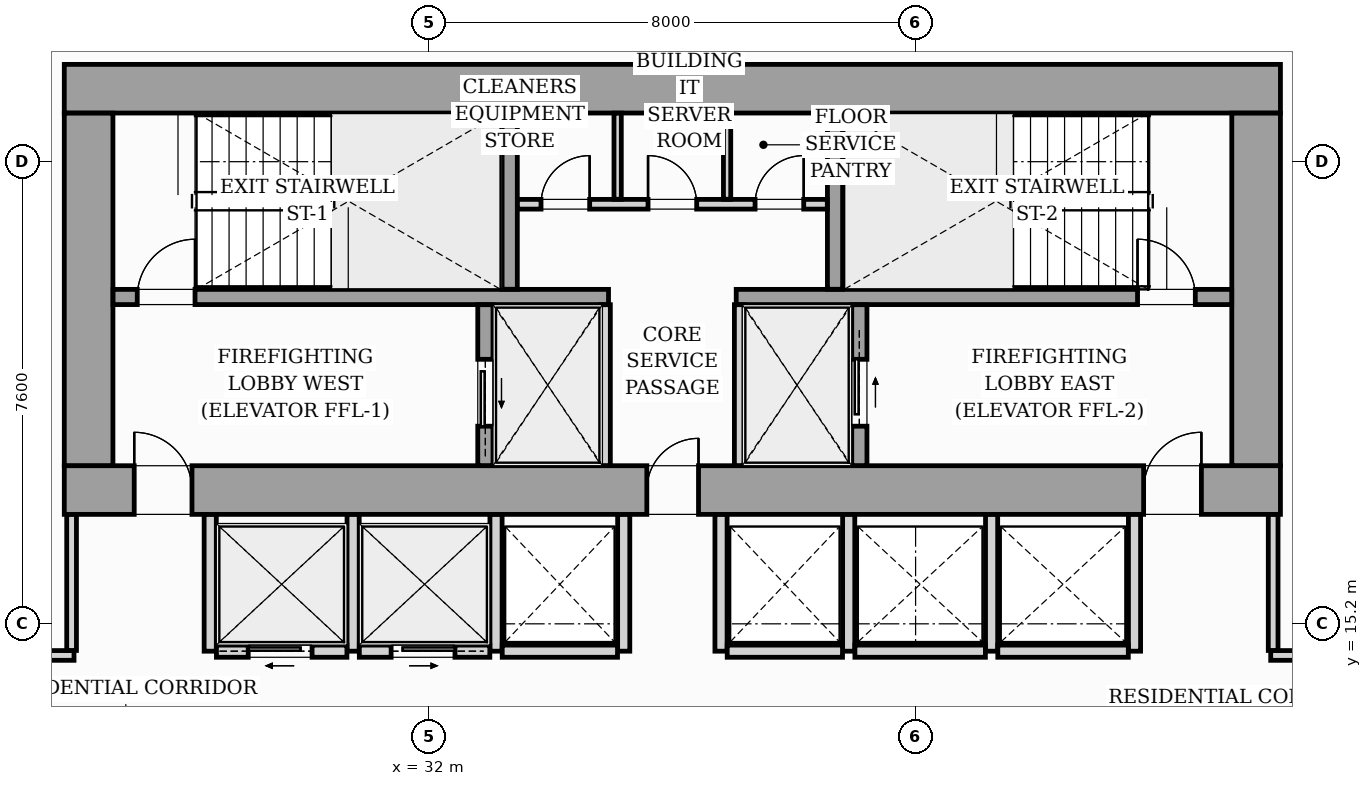
"""IFC4 building model, lengths in metres.
Left out: names, types, materials, properties, quantities, classifications, styles, units other than length and angle.
Written with IfcOpenShell. Run it as: python <this file> out.ifc"""

import sys

from ifc_helpers import new_model, si_unit, direction, frame, frame_2d, origin, origin_2d, place, context, subcontext, project, spatial, rectangle, i_section, extrude, source, transform, mapped, element, fill, save


model = new_model("IFC4")
c1 = context("Model", 3, precision=1e-05, world=origin(), true_north=direction((0.0, 1.0)))
c2 = subcontext(c1, "Body", "Model", "MODEL_VIEW")
j1 = project(units=[si_unit("LENGTHUNIT", "METRE"), si_unit("PLANEANGLEUNIT", "RADIAN")], contexts=[c1])
p1 = place(None, origin())
s1 = spatial("IfcSite", under=j1, at=p1, CompositionType="ELEMENT")
p2 = place(p1, origin())
s2 = spatial("IfcBuilding", under=s1, at=p2, CompositionType="ELEMENT")
p3 = place(p2, frame((0.0, 0.0, 29.4)))
s3 = spatial("IfcBuildingStorey", under=s2, at=p3, CompositionType="ELEMENT", Elevation=29.4)
m1 = source(origin(), c2, "Body", "SweptSolid", [
    extrude(i_section(OverallWidth=0.437, OverallDepth=0.514, WebThickness=0.061, FlangeThickness=0.097, FilletRadius=0.018, at=origin_2d()), origin(), (0.0, 0.0, 1.0), 3.196),
])
for number, where, z_axis, x_axis in (
    (1, (26.4, 17.4, 0.002), (0.0, 0.0, 1.0), (1.0, 0.0, 0.0)),
    (2, (33.12, 17.4, 0.002), (0.0, 0.0, 1.0), (1.0, 0.0, 0.0)),
    (3, (38.88, 17.4, 0.002), (0.0, 0.0, 1.0), (1.0, 0.0, 0.0)),
    (4, (45.6, 17.4, 0.002), (0.0, 0.0, 1.0), (1.0, 0.0, 0.0)),
    (5, (26.4, 24.0, 0.002), (0.0, 0.0, 1.0), (1.0, 0.0, 0.0)),
    (6, (33.12, 24.0, 0.002), (0.0, 0.0, 1.0), (1.0, 0.0, 0.0)),
    (7, (38.88, 24.0, 0.002), (0.0, 0.0, 1.0), (1.0, 0.0, 0.0)),
    (8, (45.6, 24.0, 0.002), (0.0, 0.0, 1.0), (1.0, 0.0, 0.0)),
):
    element("IfcColumn", number, at=place(p3, frame(where, z_axis=z_axis, x_axis=x_axis)), inside=s3, PredefinedType="PILASTER", context=c2, shape_type="MappedRepresentation", body=[
        mapped(m1, transform((0.0, 0.0, 0.0), scale=1.0)),
    ])
p4 = place(p3, frame((26.0, 17.4, 0.0), z_axis=(0.0, 0.0, 1.0), x_axis=(1.0, 0.0, 0.0)))
e9 = element("IfcWall", 9, at=p4, inside=s3, PredefinedType="SHEAR", context=c2, shape_type="SweptSolid", body=[
    extrude(rectangle(XDim=20.0, YDim=0.8, at=frame_2d((10.0, 0.0))), origin(), (0.0, 0.0, 1.0), 3.2),
])
p5 = place(p4, frame((1.15, 0.0, 0.0)))
e10 = element("IfcOpeningElement", 10, at=p5, cuts=e9, PredefinedType="OPENING", context=c2, shape_type="SweptSolid", body=[
    extrude(rectangle(XDim=0.95, YDim=2.06, at=frame_2d((0.475, 1.03))), frame((0.0, 0.41, 0.0), z_axis=(0.0, -1.0, 0.0), x_axis=(1.0, 0.0, 0.0)), (0.0, 0.0, 1.0), 0.82),
])
p6 = place(p4, frame((9.58, 0.0, 0.0)))
e11 = element("IfcOpeningElement", 11, at=p6, cuts=e9, PredefinedType="OPENING", context=c2, shape_type="SweptSolid", body=[
    extrude(rectangle(XDim=0.85, YDim=2.0, at=frame_2d((0.425, 1.0))), frame((0.0, 0.41, 0.0), z_axis=(0.0, -1.0, 0.0), x_axis=(1.0, 0.0, 0.0)), (0.0, 0.0, 1.0), 0.82),
])
p7 = place(p4, frame((17.75, 0.0, 0.0)))
e12 = element("IfcOpeningElement", 12, at=p7, cuts=e9, PredefinedType="OPENING", context=c2, shape_type="SweptSolid", body=[
    extrude(rectangle(XDim=0.95, YDim=2.06, at=frame_2d((0.475, 1.03))), frame((0.0, 0.41, 0.0), z_axis=(0.0, -1.0, 0.0), x_axis=(1.0, 0.0, 0.0)), (0.0, 0.0, 1.0), 0.82),
])
p8 = place(p3, frame((26.0, 24.0, 0.0), z_axis=(0.0, 0.0, 1.0), x_axis=(1.0, 0.0, 0.0)))
e13 = element("IfcWall", 13, at=p8, inside=s3, PredefinedType="SHEAR", context=c2, shape_type="SweptSolid", body=[
    extrude(rectangle(XDim=20.0, YDim=0.8, at=frame_2d((10.0, 0.0))), origin(), (0.0, 0.0, 1.0), 3.2),
])
for number, where, z_axis, x_axis in (
    (14, (26.4, 17.802, 0.0), (0.0, 0.0, 1.0), (0.0, 1.0, 0.0)),
    (15, (45.6, 17.802, 0.0), (0.0, 0.0, 1.0), (0.0, 1.0, 0.0)),
):
    element("IfcWall", number, at=place(p3, frame(where, z_axis=z_axis, x_axis=x_axis)), inside=s3, PredefinedType="SHEAR", context=c2, shape_type="SweptSolid", body=[
        extrude(rectangle(XDim=5.796, YDim=0.8, at=frame_2d((2.898, 0.0))), origin(), (0.0, 0.0, 1.0), 3.2),
    ])
p9 = place(p3, frame((26.802, 20.575, 0.0), z_axis=(0.0, 0.0, 1.0), x_axis=(1.0, 0.0, 0.0)))
e16 = element("IfcWall", 16, at=p9, inside=s3, PredefinedType="SOLIDWALL", context=c2, shape_type="SweptSolid", body=[
    extrude(rectangle(XDim=8.148, YDim=0.25, at=frame_2d((4.074, 0.0))), origin(), (0.0, 0.0, 1.0), 3.2),
])
p10 = place(p9, frame((0.398, 0.0, 0.0)))
e17 = element("IfcOpeningElement", 17, at=p10, cuts=e16, PredefinedType="OPENING", context=c2, shape_type="SweptSolid", body=[
    extrude(rectangle(XDim=0.95, YDim=2.06, at=frame_2d((0.475, 1.03))), frame((0.0, 0.135, 0.0), z_axis=(0.0, -1.0, 0.0), x_axis=(1.0, 0.0, 0.0)), (0.0, 0.0, 1.0), 0.27),
])
p11 = place(p3, frame((37.05, 20.575, 0.0), z_axis=(0.0, 0.0, 1.0), x_axis=(1.0, 0.0, 0.0)))
e18 = element("IfcWall", 18, at=p11, inside=s3, PredefinedType="SOLIDWALL", context=c2, shape_type="SweptSolid", body=[
    extrude(rectangle(XDim=8.148, YDim=0.25, at=frame_2d((4.074, 0.0))), origin(), (0.0, 0.0, 1.0), 3.2),
])
p12 = place(p11, frame((6.6, 0.0, 0.0)))
e19 = element("IfcOpeningElement", 19, at=p12, cuts=e18, PredefinedType="OPENING", context=c2, shape_type="SweptSolid", body=[
    extrude(rectangle(XDim=0.95, YDim=2.06, at=frame_2d((0.475, 1.03))), frame((0.0, 0.135, 0.0), z_axis=(0.0, -1.0, 0.0), x_axis=(1.0, 0.0, 0.0)), (0.0, 0.0, 1.0), 0.27),
])
for number, where, z_axis, x_axis in (
    (20, (33.325, 20.702, 0.0), (0.0, 0.0, 1.0), (0.0, 1.0, 0.0)),
    (21, (38.675, 20.702, 0.0), (0.0, 0.0, 1.0), (0.0, 1.0, 0.0)),
):
    element("IfcWall", number, at=place(p3, frame(where, z_axis=z_axis, x_axis=x_axis)), inside=s3, PredefinedType="SOLIDWALL", context=c2, shape_type="SweptSolid", body=[
        extrude(rectangle(XDim=2.896, YDim=0.25, at=frame_2d((1.448, 0.0))), origin(), (0.0, 0.0, 1.0), 3.2),
    ])
p13 = place(p3, frame((32.925, 17.802, 0.0), z_axis=(0.0, 0.0, 1.0), x_axis=(0.0, 1.0, 0.0)))
e22 = element("IfcWall", 22, at=p13, inside=s3, PredefinedType="SOLIDWALL", context=c2, shape_type="SweptSolid", body=[
    extrude(rectangle(XDim=2.646, YDim=0.25, at=frame_2d((1.323, 0.0))), origin(), (0.0, 0.0, 1.0), 3.2),
])
p14 = place(p13, frame((0.648, 0.0, 0.0)))
e23 = element("IfcOpeningElement", 23, at=p14, cuts=e22, PredefinedType="OPENING", context=c2, shape_type="SweptSolid", body=[
    extrude(rectangle(XDim=1.1, YDim=2.08, at=frame_2d((0.55, 1.04))), frame((0.0, 0.135, 0.0), z_axis=(0.0, -1.0, 0.0), x_axis=(1.0, 0.0, 0.0)), (0.0, 0.0, 1.0), 0.27),
])
for number, where, z_axis, x_axis in (
    (24, (34.9, 17.802, 0.0), (0.0, 0.0, 1.0), (0.0, 1.0, 0.0)),
    (25, (37.1, 17.802, 0.0), (0.0, 0.0, 1.0), (0.0, 1.0, 0.0)),
):
    element("IfcWall", number, at=place(p3, frame(where, z_axis=z_axis, x_axis=x_axis)), inside=s3, PredefinedType="PARTITIONING", context=c2, shape_type="SweptSolid", body=[
        extrude(rectangle(XDim=2.646, YDim=0.16, at=frame_2d((1.323, 0.0))), origin(), (0.0, 0.0, 1.0), 2.94),
    ])
p15 = place(p3, frame((39.075, 17.802, 0.0), z_axis=(0.0, 0.0, 1.0), x_axis=(0.0, 1.0, 0.0)))
e26 = element("IfcWall", 26, at=p15, inside=s3, PredefinedType="SOLIDWALL", context=c2, shape_type="SweptSolid", body=[
    extrude(rectangle(XDim=2.646, YDim=0.25, at=frame_2d((1.323, 0.0))), origin(), (0.0, 0.0, 1.0), 3.2),
])
p16 = place(p15, frame((0.648, 0.0, 0.0)))
e27 = element("IfcOpeningElement", 27, at=p16, cuts=e26, PredefinedType="OPENING", context=c2, shape_type="SweptSolid", body=[
    extrude(rectangle(XDim=1.1, YDim=2.08, at=frame_2d((0.55, 1.04))), frame((0.0, 0.135, 0.0), z_axis=(0.0, -1.0, 0.0), x_axis=(1.0, 0.0, 0.0)), (0.0, 0.0, 1.0), 0.27),
])
p17 = place(p3, frame((33.452, 22.1, 0.0), z_axis=(0.0, 0.0, 1.0), x_axis=(1.0, 0.0, 0.0)))
e28 = element("IfcWall", 28, at=p17, inside=s3, PredefinedType="PARTITIONING", context=c2, shape_type="SweptSolid", body=[
    extrude(rectangle(XDim=5.096, YDim=0.16, at=frame_2d((2.548, 0.0))), origin(), (0.0, 0.0, 1.0), 2.94),
])
p18 = place(p17, frame((0.388, 0.0, 0.0)))
e29 = element("IfcOpeningElement", 29, at=p18, cuts=e28, PredefinedType="OPENING", context=c2, shape_type="SweptSolid", body=[
    extrude(rectangle(XDim=0.8, YDim=2.05, at=frame_2d((0.4, 1.025))), frame((0.0, 0.09, 0.0), z_axis=(0.0, -1.0, 0.0), x_axis=(1.0, 0.0, 0.0)), (0.0, 0.0, 1.0), 0.18),
])
p19 = place(p17, frame((2.148, 0.0, 0.0)))
e30 = element("IfcOpeningElement", 30, at=p19, cuts=e28, PredefinedType="OPENING", context=c2, shape_type="SweptSolid", body=[
    extrude(rectangle(XDim=0.8, YDim=2.05, at=frame_2d((0.4, 1.025))), frame((0.0, 0.09, 0.0), z_axis=(0.0, -1.0, 0.0), x_axis=(1.0, 0.0, 0.0)), (0.0, 0.0, 1.0), 0.18),
])
p20 = place(p17, frame((3.908, 0.0, 0.0)))
e31 = element("IfcOpeningElement", 31, at=p20, cuts=e28, PredefinedType="OPENING", context=c2, shape_type="SweptSolid", body=[
    extrude(rectangle(XDim=0.8, YDim=2.05, at=frame_2d((0.4, 1.025))), frame((0.0, 0.09, 0.0), z_axis=(0.0, -1.0, 0.0), x_axis=(1.0, 0.0, 0.0)), (0.0, 0.0, 1.0), 0.18),
])
for number, where, z_axis, x_axis in (
    (32, (35.1, 22.182, 0.0), (0.0, 0.0, 1.0), (0.0, 1.0, 0.0)),
    (33, (36.9, 22.182, 0.0), (0.0, 0.0, 1.0), (0.0, 1.0, 0.0)),
):
    element("IfcWall", number, at=place(p3, frame(where, z_axis=z_axis, x_axis=x_axis)), inside=s3, PredefinedType="PARTITIONING", context=c2, shape_type="SweptSolid", body=[
        extrude(rectangle(XDim=1.416, YDim=0.12, at=frame_2d((0.708, 0.0))), origin(), (0.0, 0.0, 1.0), 2.94),
    ])
for number, where, z_axis, x_axis in (
    (34, (28.4, 14.75, 0.0), (0.0, 0.0, 1.0), (0.0, 1.0, 0.0)),
    (35, (30.75, 14.75, 0.0), (0.0, 0.0, 1.0), (0.0, 1.0, 0.0)),
    (36, (33.1, 14.75, 0.0), (0.0, 0.0, 1.0), (0.0, 1.0, 0.0)),
):
    element("IfcWall", number, at=place(p3, frame(where, z_axis=z_axis, x_axis=x_axis)), inside=s3, PredefinedType="PARTITIONING", context=c2, shape_type="SweptSolid", body=[
        extrude(rectangle(XDim=2.248, YDim=0.2, at=frame_2d((1.124, 0.0))), origin(), (0.0, 0.0, 1.0), 2.94),
    ])
p21 = place(p3, frame((28.502, 14.75, 0.0), z_axis=(0.0, 0.0, 1.0), x_axis=(1.0, 0.0, 0.0)))
e37 = element("IfcWall", 37, at=p21, inside=s3, PredefinedType="PARTITIONING", context=c2, shape_type="SweptSolid", body=[
    extrude(rectangle(XDim=2.146, YDim=0.2, at=frame_2d((1.073, 0.0))), origin(), (0.0, 0.0, 1.0), 2.94),
])
p22 = place(p21, frame((0.523, 0.0, 0.0)))
e38 = element("IfcOpeningElement", 38, at=p22, cuts=e37, PredefinedType="OPENING", context=c2, shape_type="SweptSolid", body=[
    extrude(rectangle(XDim=1.05, YDim=2.08, at=frame_2d((0.525, 1.04))), frame((0.0, 0.11, 0.0), z_axis=(0.0, -1.0, 0.0), x_axis=(1.0, 0.0, 0.0)), (0.0, 0.0, 1.0), 0.22),
])
p23 = place(p3, frame((30.852, 14.75, 0.0), z_axis=(0.0, 0.0, 1.0), x_axis=(1.0, 0.0, 0.0)))
e39 = element("IfcWall", 39, at=p23, inside=s3, PredefinedType="PARTITIONING", context=c2, shape_type="SweptSolid", body=[
    extrude(rectangle(XDim=2.146, YDim=0.2, at=frame_2d((1.073, 0.0))), origin(), (0.0, 0.0, 1.0), 2.94),
])
p24 = place(p23, frame((0.523, 0.0, 0.0)))
e40 = element("IfcOpeningElement", 40, at=p24, cuts=e39, PredefinedType="OPENING", context=c2, shape_type="SweptSolid", body=[
    extrude(rectangle(XDim=1.05, YDim=2.08, at=frame_2d((0.525, 1.04))), frame((0.0, 0.11, 0.0), z_axis=(0.0, -1.0, 0.0), x_axis=(1.0, 0.0, 0.0)), (0.0, 0.0, 1.0), 0.22),
])
p25 = place(p3, frame((35.2, 14.75, 0.0), z_axis=(0.0, 0.0, 1.0), x_axis=(0.0, 1.0, 0.0)))
e41 = element("IfcWall", 41, at=p25, inside=s3, PredefinedType="PARTITIONING", context=c2, shape_type="SweptSolid", body=[
    extrude(rectangle(XDim=2.248, YDim=0.2, at=frame_2d((1.124, 0.0))), origin(), (0.0, 0.0, 1.0), 2.94),
])
p26 = place(p3, frame((33.202, 14.75, 0.0), z_axis=(0.0, 0.0, 1.0), x_axis=(1.0, 0.0, 0.0)))
e42 = element("IfcWall", 42, at=p26, inside=s3, PredefinedType="PARTITIONING", context=c2, shape_type="SweptSolid", body=[
    extrude(rectangle(XDim=1.896, YDim=0.2, at=frame_2d((0.948, 0.0))), origin(), (0.0, 0.0, 1.0), 2.94),
])
for number, where, z_axis, x_axis in (
    (43, (36.8, 14.75, 0.0), (0.0, 0.0, 1.0), (0.0, 1.0, 0.0)),
    (44, (38.9, 14.75, 0.0), (0.0, 0.0, 1.0), (0.0, 1.0, 0.0)),
):
    element("IfcWall", number, at=place(p3, frame(where, z_axis=z_axis, x_axis=x_axis)), inside=s3, PredefinedType="PARTITIONING", context=c2, shape_type="SweptSolid", body=[
        extrude(rectangle(XDim=2.248, YDim=0.2, at=frame_2d((1.124, 0.0))), origin(), (0.0, 0.0, 1.0), 2.94),
    ])
p27 = place(p3, frame((36.902, 14.75, 0.0), z_axis=(0.0, 0.0, 1.0), x_axis=(1.0, 0.0, 0.0)))
e45 = element("IfcWall", 45, at=p27, inside=s3, PredefinedType="PARTITIONING", context=c2, shape_type="SweptSolid", body=[
    extrude(rectangle(XDim=1.896, YDim=0.2, at=frame_2d((0.948, 0.0))), origin(), (0.0, 0.0, 1.0), 2.94),
])
for number, where, z_axis, x_axis in (
    (46, (41.25, 14.75, 0.0), (0.0, 0.0, 1.0), (0.0, 1.0, 0.0)),
    (47, (43.6, 14.75, 0.0), (0.0, 0.0, 1.0), (0.0, 1.0, 0.0)),
):
    element("IfcWall", number, at=place(p3, frame(where, z_axis=z_axis, x_axis=x_axis)), inside=s3, PredefinedType="PARTITIONING", context=c2, shape_type="SweptSolid", body=[
        extrude(rectangle(XDim=2.248, YDim=0.2, at=frame_2d((1.124, 0.0))), origin(), (0.0, 0.0, 1.0), 2.94),
    ])
for number, where, z_axis, x_axis in (
    (48, (39.002, 14.75, 0.0), (0.0, 0.0, 1.0), (1.0, 0.0, 0.0)),
    (49, (41.352, 14.75, 0.0), (0.0, 0.0, 1.0), (1.0, 0.0, 0.0)),
):
    element("IfcWall", number, at=place(p3, frame(where, z_axis=z_axis, x_axis=x_axis)), inside=s3, PredefinedType="PARTITIONING", context=c2, shape_type="SweptSolid", body=[
        extrude(rectangle(XDim=2.146, YDim=0.2, at=frame_2d((1.073, 0.0))), origin(), (0.0, 0.0, 1.0), 2.94),
    ])
p28 = place(p3, frame((36.0, 24.402, 0.0), z_axis=(0.0, 0.0, 1.0), x_axis=(0.0, 1.0, 0.0)))
e50 = element("IfcWall", 50, at=p28, inside=s3, PredefinedType="PARTITIONING", context=c2, shape_type="SweptSolid", body=[
    extrude(rectangle(XDim=3.218, YDim=0.2, at=frame_2d((1.609, 0.0))), origin(), (0.0, 0.0, 1.0), 2.94),
])
p29 = place(p3, frame((15.282, 14.68, 0.0), z_axis=(0.0, 0.0, 1.0), x_axis=(1.0, 0.0, 0.0)))
e51 = element("IfcWall", 51, at=p29, inside=s3, PredefinedType="PARTITIONING", context=c2, shape_type="SweptSolid", body=[
    extrude(rectangle(XDim=10.878, YDim=0.16, at=frame_2d((5.439, 0.0))), origin(), (0.0, 0.0, 1.0), 2.94),
])
p30 = place(p29, frame((4.863, 0.0, 0.0)))
e52 = element("IfcOpeningElement", 52, at=p30, cuts=e51, PredefinedType="OPENING", context=c2, shape_type="SweptSolid", body=[
    extrude(rectangle(XDim=0.95, YDim=2.06, at=frame_2d((0.475, 1.03))), frame((0.0, 0.09, 0.0), z_axis=(0.0, -1.0, 0.0), x_axis=(1.0, 0.0, 0.0)), (0.0, 0.0, 1.0), 0.18),
])
p31 = place(p3, frame((26.12, 14.762, 0.0), z_axis=(0.0, 0.0, 1.0), x_axis=(0.0, 1.0, 0.0)))
e53 = element("IfcWall", 53, at=p31, inside=s3, PredefinedType="PARTITIONING", context=c2, shape_type="SweptSolid", body=[
    extrude(rectangle(XDim=2.236, YDim=0.16, at=frame_2d((1.118, 0.0))), origin(), (0.0, 0.0, 1.0), 2.94),
])
p32 = place(p3, frame((45.84, 14.68, 0.0), z_axis=(0.0, 0.0, 1.0), x_axis=(1.0, 0.0, 0.0)))
e54 = element("IfcWall", 54, at=p32, inside=s3, PredefinedType="PARTITIONING", context=c2, shape_type="SweptSolid", body=[
    extrude(rectangle(XDim=6.378, YDim=0.16, at=frame_2d((3.189, 0.0))), origin(), (0.0, 0.0, 1.0), 2.94),
])
p33 = place(p32, frame((2.815, 0.0, 0.0)))
e55 = element("IfcOpeningElement", 55, at=p33, cuts=e54, PredefinedType="OPENING", context=c2, shape_type="SweptSolid", body=[
    extrude(rectangle(XDim=0.95, YDim=2.06, at=frame_2d((0.475, 1.03))), frame((0.0, 0.09, 0.0), z_axis=(0.0, -1.0, 0.0), x_axis=(1.0, 0.0, 0.0)), (0.0, 0.0, 1.0), 0.18),
])
p34 = place(p3, frame((45.88, 14.762, 0.0), z_axis=(0.0, 0.0, 1.0), x_axis=(0.0, 1.0, 0.0)))
e56 = element("IfcWall", 56, at=p34, inside=s3, PredefinedType="PARTITIONING", context=c2, shape_type="SweptSolid", body=[
    extrude(rectangle(XDim=2.236, YDim=0.16, at=frame_2d((1.118, 0.0))), origin(), (0.0, 0.0, 1.0), 2.94),
])
m2 = source(origin(), c2, "Body", "SweptSolid", [
    extrude(rectangle(XDim=0.95, YDim=2.06, at=frame_2d((0.475, 1.03))), frame((0.0, 0.025, 0.0), z_axis=(0.0, -1.0, 0.0), x_axis=(1.0, 0.0, 0.0)), (0.0, 0.0, 1.0), 0.05),
])
p35 = place(p5, origin())
e57 = element("IfcDoor", 57, at=p35, inside=s3, OperationType="SINGLE_SWING_LEFT", PredefinedType="DOOR", context=c2, shape_type="MappedRepresentation", body=[
    mapped(m2, transform((0.0, 0.0, 0.0), scale=1.0)),
])
fill(e10, e57)
m3 = source(origin(), c2, "Body", "SweptSolid", [
    extrude(rectangle(XDim=0.85, YDim=2.0, at=frame_2d((0.425, 1.0))), frame((0.0, 0.025, 0.0), z_axis=(0.0, -1.0, 0.0), x_axis=(1.0, 0.0, 0.0)), (0.0, 0.0, 1.0), 0.05),
])
p36 = place(p6, origin())
e58 = element("IfcDoor", 58, at=p36, inside=s3, OperationType="SINGLE_SWING_RIGHT", PredefinedType="DOOR", context=c2, shape_type="MappedRepresentation", body=[
    mapped(m3, transform((0.0, 0.0, 0.0), scale=1.0)),
])
fill(e11, e58)
p37 = place(p7, origin())
e59 = element("IfcDoor", 59, at=p37, inside=s3, OperationType="SINGLE_SWING_RIGHT", PredefinedType="DOOR", context=c2, shape_type="MappedRepresentation", body=[
    mapped(m2, transform((0.0, 0.0, 0.0), scale=1.0)),
])
fill(e12, e59)
p38 = place(p10, origin())
e60 = element("IfcDoor", 60, at=p38, inside=s3, OperationType="SINGLE_SWING_RIGHT", PredefinedType="DOOR", context=c2, shape_type="MappedRepresentation", body=[
    mapped(m2, transform((0.0, 0.0, 0.0), scale=1.0)),
])
fill(e17, e60)
p39 = place(p12, origin())
e61 = element("IfcDoor", 61, at=p39, inside=s3, OperationType="SINGLE_SWING_LEFT", PredefinedType="DOOR", context=c2, shape_type="MappedRepresentation", body=[
    mapped(m2, transform((0.0, 0.0, 0.0), scale=1.0)),
])
fill(e19, e61)
m4 = source(origin(), c2, "Body", "SweptSolid", [
    extrude(rectangle(XDim=1.1, YDim=2.08, at=frame_2d((0.55, 1.04))), frame((0.0, 0.025, 0.0), z_axis=(0.0, -1.0, 0.0), x_axis=(1.0, 0.0, 0.0)), (0.0, 0.0, 1.0), 0.05),
])
p40 = place(p14, origin())
e62 = element("IfcDoor", 62, at=p40, inside=s3, OperationType="SLIDING_TO_LEFT", PredefinedType="DOOR", context=c2, shape_type="MappedRepresentation", body=[
    mapped(m4, transform((0.0, 0.0, 0.0), scale=1.0)),
])
fill(e23, e62)
p41 = place(p16, origin())
e63 = element("IfcDoor", 63, at=p41, inside=s3, OperationType="SLIDING_TO_RIGHT", PredefinedType="DOOR", context=c2, shape_type="MappedRepresentation", body=[
    mapped(m4, transform((0.0, 0.0, 0.0), scale=1.0)),
])
fill(e27, e63)
m5 = source(origin(), c2, "Body", "SweptSolid", [
    extrude(rectangle(XDim=0.8, YDim=2.05, at=frame_2d((0.4, 1.025))), frame((0.0, 0.025, 0.0), z_axis=(0.0, -1.0, 0.0), x_axis=(1.0, 0.0, 0.0)), (0.0, 0.0, 1.0), 0.05),
])
p42 = place(p18, origin())
e64 = element("IfcDoor", 64, at=p42, inside=s3, OperationType="SINGLE_SWING_RIGHT", PredefinedType="DOOR", context=c2, shape_type="MappedRepresentation", body=[
    mapped(m5, transform((0.0, 0.0, 0.0), scale=1.0)),
])
fill(e29, e64)
p43 = place(p19, origin())
e65 = element("IfcDoor", 65, at=p43, inside=s3, OperationType="SINGLE_SWING_LEFT", PredefinedType="DOOR", context=c2, shape_type="MappedRepresentation", body=[
    mapped(m5, transform((0.0, 0.0, 0.0), scale=1.0)),
])
fill(e30, e65)
p44 = place(p20, origin())
e66 = element("IfcDoor", 66, at=p44, inside=s3, OperationType="SINGLE_SWING_RIGHT", PredefinedType="DOOR", context=c2, shape_type="MappedRepresentation", body=[
    mapped(m5, transform((0.0, 0.0, 0.0), scale=1.0)),
])
fill(e31, e66)
m6 = source(origin(), c2, "Body", "SweptSolid", [
    extrude(rectangle(XDim=1.05, YDim=2.08, at=frame_2d((0.525, 1.04))), frame((0.0, 0.025, 0.0), z_axis=(0.0, -1.0, 0.0), x_axis=(1.0, 0.0, 0.0)), (0.0, 0.0, 1.0), 0.05),
])
p45 = place(p22, origin())
e67 = element("IfcDoor", 67, at=p45, inside=s3, OperationType="SLIDING_TO_LEFT", PredefinedType="DOOR", context=c2, shape_type="MappedRepresentation", body=[
    mapped(m6, transform((0.0, 0.0, 0.0), scale=1.0)),
])
fill(e38, e67)
p46 = place(p24, origin())
e68 = element("IfcDoor", 68, at=p46, inside=s3, OperationType="SLIDING_TO_RIGHT", PredefinedType="DOOR", context=c2, shape_type="MappedRepresentation", body=[
    mapped(m6, transform((0.0, 0.0, 0.0), scale=1.0)),
])
fill(e40, e68)
save(model, sys.argv[1])
